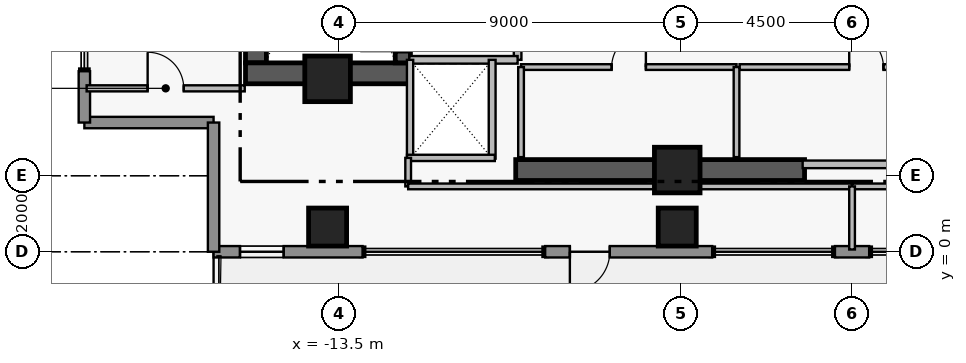
"""IFC4 building model, lengths in metres.
Left out: names, types, materials, properties, quantities, classifications, styles, units other than length and angle.
Written with IfcOpenShell. Run it as: python <this file> out.ifc"""

import sys

from ifc_helpers import new_model, si_unit, direction, frame, frame_2d, origin, origin_2d, place, context, subcontext, project, spatial, rectangle, extrude, element, fill, save


model = new_model("IFC4")
c1 = context("Model", 3, precision=1e-05, world=origin(), true_north=direction((0.0, 1.0)))
c2 = subcontext(c1, "Body", "Model", "MODEL_VIEW")
j1 = project(units=[si_unit("LENGTHUNIT", "METRE"), si_unit("PLANEANGLEUNIT", "RADIAN")], contexts=[c1])
p1 = place(None, origin())
s1 = spatial("IfcSite", under=j1, at=p1, CompositionType="ELEMENT")
p2 = place(p1, origin())
s2 = spatial("IfcBuilding", under=s1, at=p2, CompositionType="ELEMENT")
p3 = place(p2, frame((0.0, 0.0, 265.55)))
s3 = spatial("IfcBuildingStorey", under=s2, at=p3, CompositionType="ELEMENT", Elevation=265.55)
p4 = place(p3, frame((-15.685, 4.97, 0.0), z_axis=(0.0, 0.0, 1.0), x_axis=(0.0, 1.0, 0.0)))
e1 = element("IfcWall", 1, at=p4, inside=s3, PredefinedType="SHEAR", context=c2, shape_type="SweptSolid", body=[
    extrude(rectangle(XDim=8.96, YDim=0.55, at=frame_2d((4.48, 0.0))), origin(), (0.0, 0.0, 1.0), 3.51),
])
p5 = place(p3, frame((-15.96, 4.695, 0.0), z_axis=(0.0, 0.0, 1.0), x_axis=(1.0, 0.0, 0.0)))
e2 = element("IfcWall", 2, at=p5, inside=s3, PredefinedType="SHEAR", context=c2, shape_type="SweptSolid", body=[
    extrude(rectangle(XDim=4.36, YDim=0.55, at=frame_2d((2.18, 0.0))), origin(), (0.0, 0.0, 1.0), 3.51),
])
p6 = place(p3, frame((-8.85, 2.15, 0.0), z_axis=(0.0, 0.0, 1.0), x_axis=(1.0, 0.0, 0.0)))
e3 = element("IfcWall", 3, at=p6, inside=s3, PredefinedType="SHEAR", context=c2, shape_type="SweptSolid", body=[
    extrude(rectangle(XDim=7.6, YDim=0.55, at=frame_2d((3.8, 0.0))), origin(), (0.0, 0.0, 1.0), 3.48),
])
p7 = place(p3, frame((-11.82, 4.97, 0.0), z_axis=(0.0, 0.0, 1.0), x_axis=(0.0, 1.0, 0.0)))
e4 = element("IfcWall", 4, at=p7, inside=s3, PredefinedType="SHEAR", context=c2, shape_type="SweptSolid", body=[
    extrude(rectangle(XDim=8.96, YDim=0.4, at=frame_2d((4.48, 0.0))), origin(), (0.0, 0.0, 1.0), 3.51),
])
p8 = place(p7, frame((0.31, 0.0, 0.0)))
e5 = element("IfcOpeningElement", 5, at=p8, cuts=e4, PredefinedType="OPENING", context=c2, shape_type="SweptSolid", body=[
    extrude(rectangle(XDim=1.12, YDim=2.22, at=frame_2d((0.56, 1.11))), frame((0.0, 0.21, 0.0), z_axis=(0.0, -1.0, 0.0), x_axis=(1.0, 0.0, 0.0)), (0.0, 0.0, 1.0), 0.42),
])
for number, where, z_axis, x_axis in (
    (6, (-13.8, 4.55, 0.0), (0.0, 0.0, 1.0), (1.0, 0.0, 0.0)),
    (7, (-4.6, 2.15, 0.0), (0.0, 0.0, 1.0), (1.0, 0.0, 0.0)),
):
    element("IfcColumn", number, at=place(p3, frame(where, z_axis=z_axis, x_axis=x_axis)), inside=s3, PredefinedType="COLUMN", context=c2, shape_type="SweptSolid", body=[
        extrude(rectangle(XDim=1.2, YDim=1.2, at=origin_2d()), origin(), (0.0, 0.0, 1.0), 3.7),
    ])
for number, where, z_axis, x_axis in (
    (8, (-13.8, 0.65, 0.0), (0.0, 0.0, 1.0), (1.0, 0.0, 0.0)),
    (9, (-4.6, 0.65, 0.0), (0.0, 0.0, 1.0), (1.0, 0.0, 0.0)),
):
    element("IfcColumn", number, at=place(p3, frame(where, z_axis=z_axis, x_axis=x_axis)), inside=s3, PredefinedType="COLUMN", context=c2, shape_type="SweptSolid", body=[
        extrude(rectangle(XDim=1.0, YDim=1.0, at=origin_2d()), origin(), (0.0, 0.0, 1.0), 3.7),
    ])
p9 = place(p3, frame((-16.8, 3.4, 0.0), z_axis=(0.0, 0.0, 1.0), x_axis=(-1.0, 0.0, 0.0)))
e10 = element("IfcWall", 10, at=p9, inside=s3, PredefinedType="STANDARD", context=c2, shape_type="SweptSolid", body=[
    extrude(rectangle(XDim=3.4, YDim=0.3, at=frame_2d((1.7, 0.0))), origin(), (0.0, 0.0, 1.0), 3.48),
])
p10 = place(p3, frame((-20.2, 3.4, 0.0), z_axis=(0.0, 0.0, 1.0), x_axis=(0.0, 1.0, 0.0)))
e11 = element("IfcWall", 11, at=p10, inside=s3, PredefinedType="STANDARD", context=c2, shape_type="SweptSolid", body=[
    extrude(rectangle(XDim=1.35, YDim=0.3, at=frame_2d((0.675, 0.0))), origin(), (0.0, 0.0, 1.0), 3.48),
])
p11 = place(p3, frame((0.45, 0.0, 0.0), z_axis=(0.0, 0.0, 1.0), x_axis=(-1.0, 0.0, 0.0)))
e12 = element("IfcWall", 12, at=p11, inside=s3, PredefinedType="STANDARD", context=c2, shape_type="SweptSolid", body=[
    extrude(rectangle(XDim=0.9, YDim=0.3, at=frame_2d((0.45, 0.0))), origin(), (0.0, 0.0, 1.0), 3.48),
])
p12 = place(p3, frame((-3.68, 0.0, 0.0), z_axis=(0.0, 0.0, 1.0), x_axis=(-1.0, 0.0, 0.0)))
e13 = element("IfcWall", 13, at=p12, inside=s3, PredefinedType="STANDARD", context=c2, shape_type="SweptSolid", body=[
    extrude(rectangle(XDim=4.395, YDim=0.3, at=frame_2d((2.198, 0.0))), origin(), (0.0, 0.0, 1.0), 3.48),
])
p13 = place(p12, frame((2.695, 0.0, 0.0)))
e14 = element("IfcOpeningElement", 14, at=p13, cuts=e13, PredefinedType="OPENING", context=c2, shape_type="SweptSolid", body=[
    extrude(rectangle(XDim=1.05, YDim=2.2, at=frame_2d((0.525, 1.1))), frame((0.0, 0.16, 0.0), z_axis=(0.0, -1.0, 0.0), x_axis=(1.0, 0.0, 0.0)), (0.0, 0.0, 1.0), 0.32),
])
p14 = place(p3, frame((-12.88, 0.0, 0.0), z_axis=(0.0, 0.0, 1.0), x_axis=(-1.0, 0.0, 0.0)))
e15 = element("IfcWall", 15, at=p14, inside=s3, PredefinedType="STANDARD", context=c2, shape_type="SweptSolid", body=[
    extrude(rectangle(XDim=3.92, YDim=0.3, at=frame_2d((1.96, 0.0))), origin(), (0.0, 0.0, 1.0), 3.48),
])
p15 = place(p14, frame((2.075, 0.0, 0.95)))
e16 = element("IfcOpeningElement", 16, at=p15, cuts=e15, PredefinedType="OPENING", context=c2, shape_type="SweptSolid", body=[
    extrude(rectangle(XDim=1.15, YDim=1.55, at=frame_2d((0.575, 0.775))), frame((0.0, 0.16, 0.0), z_axis=(0.0, -1.0, 0.0), x_axis=(1.0, 0.0, 0.0)), (0.0, 0.0, 1.0), 0.32),
])
p16 = place(p3, frame((-16.8, 0.0, 0.0), z_axis=(0.0, 0.0, 1.0), x_axis=(0.0, 1.0, 0.0)))
e17 = element("IfcWall", 17, at=p16, inside=s3, PredefinedType="STANDARD", context=c2, shape_type="SweptSolid", body=[
    extrude(rectangle(XDim=3.4, YDim=0.3, at=frame_2d((1.7, 0.0))), origin(), (0.0, 0.0, 1.0), 3.48),
])
p17 = place(p3, frame((-8.8, 5.05, 0.0), z_axis=(0.0, 0.0, 1.0), x_axis=(0.0, 1.0, 0.0)))
e18 = element("IfcWall", 18, at=p17, inside=s3, PredefinedType="PARTITIONING", context=c2, shape_type="SweptSolid", body=[
    extrude(rectangle(XDim=6.1, YDim=0.2, at=frame_2d((3.05, 0.0))), origin(), (0.0, 0.0, 1.0), 3.48),
])
p18 = place(p17, frame((0.25, 0.0, 0.0)))
e19 = element("IfcOpeningElement", 19, at=p18, cuts=e18, PredefinedType="OPENING", context=c2, shape_type="SweptSolid", body=[
    extrude(rectangle(XDim=1.1, YDim=2.2, at=frame_2d((0.55, 1.1))), frame((0.0, 0.11, 0.0), z_axis=(0.0, -1.0, 0.0), x_axis=(1.0, 0.0, 0.0)), (0.0, 0.0, 1.0), 0.22),
])
p19 = place(p17, frame((3.85, 0.0, 0.0)))
e20 = element("IfcOpeningElement", 20, at=p19, cuts=e18, PredefinedType="OPENING", context=c2, shape_type="SweptSolid", body=[
    extrude(rectangle(XDim=1.1, YDim=2.2, at=frame_2d((0.55, 1.1))), frame((0.0, 0.11, 0.0), z_axis=(0.0, -1.0, 0.0), x_axis=(1.0, 0.0, 0.0)), (0.0, 0.0, 1.0), 0.22),
])
p20 = place(p3, frame((-8.71, 4.86, 0.0), z_axis=(0.0, 0.0, 1.0), x_axis=(1.0, 0.0, 0.0)))
e21 = element("IfcWall", 21, at=p20, inside=s3, PredefinedType="PARTITIONING", context=c2, shape_type="SweptSolid", body=[
    extrude(rectangle(XDim=5.67, YDim=0.15, at=frame_2d((2.835, 0.0))), origin(), (0.0, 0.0, 1.0), 3.48),
])
p21 = place(p20, frame((2.385, 0.0, 0.0)))
e22 = element("IfcOpeningElement", 22, at=p21, cuts=e21, PredefinedType="OPENING", context=c2, shape_type="SweptSolid", body=[
    extrude(rectangle(XDim=0.9, YDim=2.15, at=frame_2d((0.45, 1.075))), frame((0.0, 0.085, 0.0), z_axis=(0.0, -1.0, 0.0), x_axis=(1.0, 0.0, 0.0)), (0.0, 0.0, 1.0), 0.17),
])
p22 = place(p3, frame((-2.96, 4.86, 0.0), z_axis=(0.0, 0.0, 1.0), x_axis=(1.0, 0.0, 0.0)))
e23 = element("IfcWall", 23, at=p22, inside=s3, PredefinedType="PARTITIONING", context=c2, shape_type="SweptSolid", body=[
    extrude(rectangle(XDim=6.67, YDim=0.15, at=frame_2d((3.335, 0.0))), origin(), (0.0, 0.0, 1.0), 3.48),
])
p23 = place(p22, frame((2.885, 0.0, 0.0)))
e24 = element("IfcOpeningElement", 24, at=p23, cuts=e23, PredefinedType="OPENING", context=c2, shape_type="SweptSolid", body=[
    extrude(rectangle(XDim=0.9, YDim=2.15, at=frame_2d((0.45, 1.075))), frame((0.0, 0.085, 0.0), z_axis=(0.0, -1.0, 0.0), x_axis=(1.0, 0.0, 0.0)), (0.0, 0.0, 1.0), 0.17),
])
p24 = place(p3, frame((-20.14, 4.3, 0.0), z_axis=(0.0, 0.0, 1.0), x_axis=(1.0, 0.0, 0.0)))
e25 = element("IfcWall", 25, at=p24, inside=s3, PredefinedType="PARTITIONING", context=c2, shape_type="SweptSolid", body=[
    extrude(rectangle(XDim=4.16, YDim=0.16, at=frame_2d((2.08, 0.0))), origin(), (0.0, 0.0, 1.0), 3.48),
])
p25 = place(p24, frame((1.605, 0.0, 0.0)))
e26 = element("IfcOpeningElement", 26, at=p25, cuts=e25, PredefinedType="OPENING", context=c2, shape_type="SweptSolid", body=[
    extrude(rectangle(XDim=0.95, YDim=2.15, at=frame_2d((0.475, 1.075))), frame((0.0, 0.09, 0.0), z_axis=(0.0, -1.0, 0.0), x_axis=(1.0, 0.0, 0.0)), (0.0, 0.0, 1.0), 0.18),
])
p26 = place(p3, frame((-11.65, 5.05, 0.0), z_axis=(0.0, 0.0, 1.0), x_axis=(1.0, 0.0, 0.0)))
e27 = element("IfcWall", 27, at=p26, inside=s3, PredefinedType="PARTITIONING", context=c2, shape_type="SweptSolid", body=[
    extrude(rectangle(XDim=2.85, YDim=0.2, at=frame_2d((1.425, 0.0))), origin(), (0.0, 0.0, 1.0), 3.48),
])
p27 = place(p3, frame((-1.3, 2.3, 0.0), z_axis=(0.0, 0.0, 1.0), x_axis=(1.0, 0.0, 0.0)))
e28 = element("IfcWall", 28, at=p27, inside=s3, PredefinedType="PARTITIONING", context=c2, shape_type="SweptSolid", body=[
    extrude(rectangle(XDim=2.6, YDim=0.2, at=frame_2d((1.3, 0.0))), origin(), (0.0, 0.0, 1.0), 2.38),
])
for number, where, z_axis, x_axis in (
    (29, (-8.71, 2.49, 0.0), (0.0, 0.0, 1.0), (0.0, 1.0, 0.0)),
    (30, (-3.04, 2.49, 0.0), (0.0, 0.0, 1.0), (0.0, 1.0, 0.0)),
):
    element("IfcWall", number, at=place(p3, frame(where, z_axis=z_axis, x_axis=x_axis)), inside=s3, PredefinedType="PARTITIONING", context=c2, shape_type="SweptSolid", body=[
        extrude(rectangle(XDim=2.37, YDim=0.15, at=frame_2d((1.185, 0.0))), origin(), (0.0, 0.0, 1.0), 3.48),
    ])
p28 = place(p3, frame((-9.47, 2.45, 0.0), z_axis=(0.0, 0.0, 1.0), x_axis=(0.0, 1.0, 0.0)))
e31 = element("IfcWall", 31, at=p28, inside=s3, PredefinedType="PARTITIONING", context=c2, shape_type="SweptSolid", body=[
    extrude(rectangle(XDim=2.6, YDim=0.18, at=frame_2d((1.3, 0.0))), origin(), (0.0, 0.0, 1.0), 3.48),
])
p29 = place(p3, frame((-11.63, 2.47, 0.0), z_axis=(0.0, 0.0, 1.0), x_axis=(0.0, 1.0, 0.0)))
e32 = element("IfcWall", 32, at=p29, inside=s3, PredefinedType="PARTITIONING", context=c2, shape_type="SweptSolid", body=[
    extrude(rectangle(XDim=2.58, YDim=0.165, at=frame_2d((1.29, 0.0))), origin(), (0.0, 0.0, 1.0), 3.48),
])
p30 = place(p3, frame((-11.71, 2.47, 0.0), z_axis=(0.0, 0.0, 1.0), x_axis=(1.0, 0.0, 0.0)))
e33 = element("IfcWall", 33, at=p30, inside=s3, PredefinedType="PARTITIONING", context=c2, shape_type="SweptSolid", body=[
    extrude(rectangle(XDim=2.31, YDim=0.165, at=frame_2d((1.155, 0.0))), origin(), (0.0, 0.0, 1.0), 2.38),
])
p31 = place(p3, frame((-11.68, 1.72, 0.0), z_axis=(0.0, 0.0, 1.0), x_axis=(0.0, 1.0, 0.0)))
e34 = element("IfcWall", 34, at=p31, inside=s3, PredefinedType="PARTITIONING", context=c2, shape_type="SweptSolid", body=[
    extrude(rectangle(XDim=0.75, YDim=0.15, at=frame_2d((0.375, 0.0))), origin(), (0.0, 0.0, 1.0), 3.48),
])
for number, where, z_axis, x_axis in (
    (35, (-11.68, 1.72, 0.0), (0.0, 0.0, 1.0), (1.0, 0.0, 0.0)),
    (36, (0.0, 1.72, 0.0), (0.0, 0.0, 1.0), (1.0, 0.0, 0.0)),
):
    element("IfcWall", number, at=place(p3, frame(where, z_axis=z_axis, x_axis=x_axis)), inside=s3, PredefinedType="PARTITIONING", context=c2, shape_type="SweptSolid", body=[
        extrude(rectangle(XDim=11.68, YDim=0.15, at=frame_2d((5.84, 0.0))), origin(), (0.0, 0.0, 1.0), 2.38),
    ])
p32 = place(p3, frame((0.0, 0.06, 0.0), z_axis=(0.0, 0.0, 1.0), x_axis=(0.0, 1.0, 0.0)))
e37 = element("IfcWall", 37, at=p32, inside=s3, PredefinedType="PARTITIONING", context=c2, shape_type="SweptSolid", body=[
    extrude(rectangle(XDim=1.66, YDim=0.15, at=frame_2d((0.83, 0.0))), origin(), (0.0, 0.0, 1.0), 3.48),
])
p33 = place(p13, origin())
e38 = element("IfcDoor", 38, at=p33, inside=s3, OperationType="SINGLE_SWING_RIGHT", PredefinedType="DOOR", context=c2, shape_type="SweptSolid", body=[
    extrude(rectangle(XDim=1.05, YDim=2.2, at=frame_2d((0.525, 1.1))), frame((0.0, 0.025, 0.0), z_axis=(0.0, -1.0, 0.0), x_axis=(1.0, 0.0, 0.0)), (0.0, 0.0, 1.0), 0.05),
])
fill(e14, e38)
p34 = place(p15, origin())
e39 = element("IfcWindow", 39, at=p34, inside=s3, PartitioningType="SINGLE_PANEL", PredefinedType="WINDOW", context=c2, shape_type="SweptSolid", body=[
    extrude(rectangle(XDim=1.15, YDim=1.55, at=frame_2d((0.575, 0.775))), frame((0.0, 0.03, 0.0), z_axis=(0.0, -1.0, 0.0), x_axis=(1.0, 0.0, 0.0)), (0.0, 0.0, 1.0), 0.06),
])
fill(e16, e39)
p35 = place(p21, origin())
e40 = element("IfcDoor", 40, at=p35, inside=s3, OperationType="SINGLE_SWING_RIGHT", PredefinedType="DOOR", context=c2, shape_type="SweptSolid", body=[
    extrude(rectangle(XDim=0.9, YDim=2.15, at=frame_2d((0.45, 1.075))), frame((0.0, 0.025, 0.0), z_axis=(0.0, -1.0, 0.0), x_axis=(1.0, 0.0, 0.0)), (0.0, 0.0, 1.0), 0.05),
])
fill(e22, e40)
p36 = place(p23, origin())
e41 = element("IfcDoor", 41, at=p36, inside=s3, OperationType="SINGLE_SWING_LEFT", PredefinedType="DOOR", context=c2, shape_type="SweptSolid", body=[
    extrude(rectangle(XDim=0.9, YDim=2.15, at=frame_2d((0.45, 1.075))), frame((0.0, 0.025, 0.0), z_axis=(0.0, -1.0, 0.0), x_axis=(1.0, 0.0, 0.0)), (0.0, 0.0, 1.0), 0.05),
])
fill(e24, e41)
p37 = place(p25, origin())
e42 = element("IfcDoor", 42, at=p37, inside=s3, OperationType="SINGLE_SWING_LEFT", PredefinedType="DOOR", context=c2, shape_type="SweptSolid", body=[
    extrude(rectangle(XDim=0.95, YDim=2.15, at=frame_2d((0.475, 1.075))), frame((0.0, 0.025, 0.0), z_axis=(0.0, -1.0, 0.0), x_axis=(1.0, 0.0, 0.0)), (0.0, 0.0, 1.0), 0.05),
])
fill(e26, e42)
save(model, sys.argv[1])
